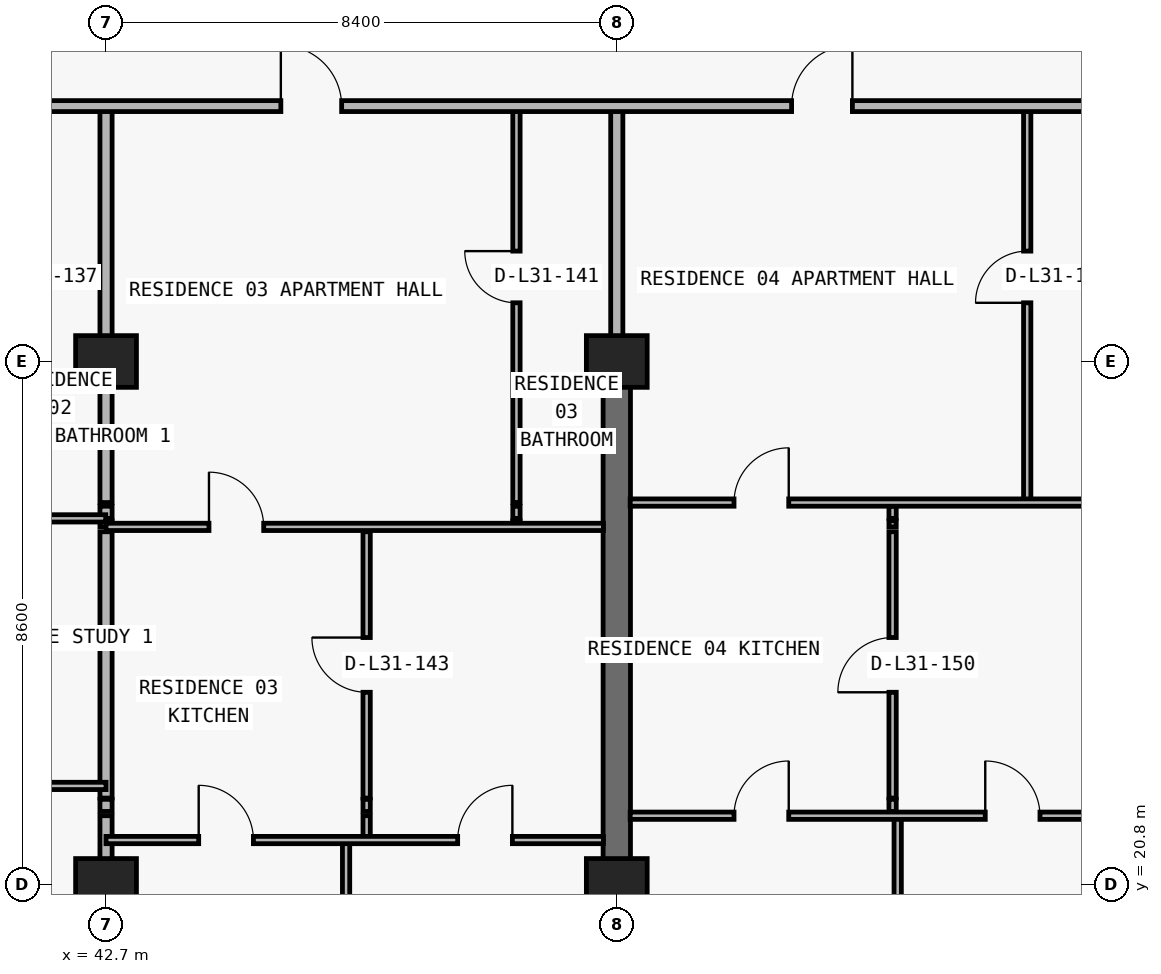
"""IFC4 building model, lengths in metres.
Left out: names, types, materials, properties, quantities, classifications, styles, units other than length and angle.
Written with IfcOpenShell. Run it as: python <this file> out.ifc"""

import sys

from ifc_helpers import new_model, si_unit, direction, frame, frame_2d, origin, origin_2d, place, context, subcontext, project, spatial, rectangle, extrude, element, fill, save


model = new_model("IFC4")
c1 = context("Model", 3, precision=1e-05, world=origin(), true_north=direction((0.0, 1.0)))
c2 = subcontext(c1, "Body", "Model", "MODEL_VIEW")
j1 = project(units=[si_unit("LENGTHUNIT", "METRE"), si_unit("PLANEANGLEUNIT", "RADIAN")], contexts=[c1])
p1 = place(None, origin())
s1 = spatial("IfcSite", under=j1, at=p1, CompositionType="ELEMENT")
p2 = place(p1, origin())
s2 = spatial("IfcBuilding", under=s1, at=p2, CompositionType="ELEMENT")
p3 = place(p2, frame((0.0, 0.0, 115.8)))
s3 = spatial("IfcBuildingStorey", under=s2, at=p3, CompositionType="ELEMENT", Elevation=115.8)
for number, where, z_axis, x_axis in (
    (1, (42.7, 20.8, 0.0), (0.0, 0.0, 1.0), (1.0, 0.0, 0.0)),
    (2, (51.1, 20.8, 0.0), (0.0, 0.0, 1.0), (1.0, 0.0, 0.0)),
    (3, (42.7, 29.4, 0.0), (0.0, 0.0, 1.0), (1.0, 0.0, 0.0)),
    (4, (51.1, 29.4, 0.0), (0.0, 0.0, 1.0), (1.0, 0.0, 0.0)),
):
    element("IfcColumn", number, at=place(p3, frame(where, z_axis=z_axis, x_axis=x_axis)), inside=s3, PredefinedType="COLUMN", context=c2, shape_type="SweptSolid", body=[
        extrude(rectangle(XDim=1.0, YDim=0.85, at=origin_2d()), origin(), (0.0, 0.0, 1.0), 3.05),
    ])
p4 = place(p3, frame((51.1, 20.8, 0.0), z_axis=(0.0, 0.0, 1.0), x_axis=(0.0, 1.0, 0.0)))
e5 = element("IfcWall", 5, at=p4, inside=s3, PredefinedType="SHEAR", context=c2, shape_type="SweptSolid", body=[
    extrude(rectangle(XDim=8.6, YDim=0.45, at=frame_2d((4.3, 0.0))), origin(), (0.0, 0.0, 1.0), 3.05),
])
p5 = place(p3, frame((42.7, 8.84, 0.0), z_axis=(0.0, 0.0, 1.0), x_axis=(0.0, 1.0, 0.0)))
e6 = element("IfcWall", 6, at=p5, inside=s3, PredefinedType="PARTITIONING", context=c2, shape_type="SweptSolid", body=[
    extrude(rectangle(XDim=13.09, YDim=0.2, at=frame_2d((6.545, 0.0))), origin(), (0.0, 0.0, 1.0), 2.174),
])
p6 = place(p3, frame((42.7, 22.0, 0.0), z_axis=(0.0, 0.0, 1.0), x_axis=(0.0, 1.0, 0.0)))
e7 = element("IfcWall", 7, at=p6, inside=s3, PredefinedType="PARTITIONING", context=c2, shape_type="SweptSolid", body=[
    extrude(rectangle(XDim=0.2, YDim=0.2, at=frame_2d((0.1, 0.0))), origin(), (0.0, 0.0, 1.0), 2.174),
])
p7 = place(p3, frame((42.7, 22.22, 0.0), z_axis=(0.0, 0.0, 1.0), x_axis=(0.0, 1.0, 0.0)))
e8 = element("IfcWall", 8, at=p7, inside=s3, PredefinedType="PARTITIONING", context=c2, shape_type="SweptSolid", body=[
    extrude(rectangle(XDim=4.38, YDim=0.2, at=frame_2d((2.19, 0.0))), origin(), (0.0, 0.0, 1.0), 2.174),
])
p8 = place(p3, frame((42.7, 26.68, 0.0), z_axis=(0.0, 0.0, 1.0), x_axis=(0.0, 1.0, 0.0)))
e9 = element("IfcWall", 9, at=p8, inside=s3, PredefinedType="PARTITIONING", context=c2, shape_type="SweptSolid", body=[
    extrude(rectangle(XDim=0.1, YDim=0.2, at=frame_2d((0.05, 0.0))), origin(), (0.0, 0.0, 1.0), 2.174),
])
p9 = place(p3, frame((42.7, 26.82, 0.0), z_axis=(0.0, 0.0, 1.0), x_axis=(0.0, 1.0, 0.0)))
e10 = element("IfcWall", 10, at=p9, inside=s3, PredefinedType="PARTITIONING", context=c2, shape_type="SweptSolid", body=[
    extrude(rectangle(XDim=0.2, YDim=0.2, at=frame_2d((0.1, 0.0))), origin(), (0.0, 0.0, 1.0), 2.174),
])
p10 = place(p3, frame((42.7, 27.08, 0.0), z_axis=(0.0, 0.0, 1.0), x_axis=(0.0, 1.0, 0.0)))
e11 = element("IfcWall", 11, at=p10, inside=s3, PredefinedType="PARTITIONING", context=c2, shape_type="SweptSolid", body=[
    extrude(rectangle(XDim=6.52, YDim=0.2, at=frame_2d((3.26, 0.0))), origin(), (0.0, 0.0, 1.0), 2.174),
])
p11 = place(p3, frame((46.648, 8.84, 0.0), z_axis=(0.0, 0.0, 1.0), x_axis=(0.0, 1.0, 0.0)))
e12 = element("IfcWall", 12, at=p11, inside=s3, PredefinedType="PARTITIONING", context=c2, shape_type="SweptSolid", body=[
    extrude(rectangle(XDim=12.69, YDim=0.12, at=frame_2d((6.345, 0.0))), origin(), (0.0, 0.0, 1.0), 3.05),
])
p12 = place(p3, frame((46.986, 21.53, 0.0), z_axis=(0.0, 0.0, 1.0), x_axis=(0.0, 1.0, 0.0)))
e13 = element("IfcWall", 13, at=p12, inside=s3, PredefinedType="PARTITIONING", context=c2, shape_type="SweptSolid", body=[
    extrude(rectangle(XDim=0.4, YDim=0.12, at=frame_2d((0.2, 0.0))), origin(), (0.0, 0.0, 1.0), 3.05),
])
p13 = place(p3, frame((46.986, 22.0, 0.0), z_axis=(0.0, 0.0, 1.0), x_axis=(0.0, 1.0, 0.0)))
e14 = element("IfcWall", 14, at=p13, inside=s3, PredefinedType="PARTITIONING", context=c2, shape_type="SweptSolid", body=[
    extrude(rectangle(XDim=0.2, YDim=0.12, at=frame_2d((0.1, 0.0))), origin(), (0.0, 0.0, 1.0), 3.05),
])
p14 = place(p3, frame((46.986, 22.22, 0.0), z_axis=(0.0, 0.0, 1.0), x_axis=(0.0, 1.0, 0.0)))
e15 = element("IfcWall", 15, at=p14, inside=s3, PredefinedType="PARTITIONING", context=c2, shape_type="SweptSolid", body=[
    extrude(rectangle(XDim=4.38, YDim=0.12, at=frame_2d((2.19, 0.0))), origin(), (0.0, 0.0, 1.0), 3.05),
])
p15 = place(p14, frame((1.74, 0.0, 0.0)))
e16 = element("IfcOpeningElement", 16, at=p15, cuts=e15, PredefinedType="OPENING", context=c2, shape_type="SweptSolid", body=[
    extrude(rectangle(XDim=0.9, YDim=2.15, at=frame_2d((0.45, 1.075))), frame((0.0, 0.07, 0.0), z_axis=(0.0, -1.0, 0.0), x_axis=(1.0, 0.0, 0.0)), (0.0, 0.0, 1.0), 0.14),
])
p16 = place(p3, frame((49.45, 26.68, 0.0), z_axis=(0.0, 0.0, 1.0), x_axis=(0.0, 1.0, 0.0)))
e17 = element("IfcWall", 17, at=p16, inside=s3, PredefinedType="PARTITIONING", context=c2, shape_type="SweptSolid", body=[
    extrude(rectangle(XDim=0.1, YDim=0.12, at=frame_2d((0.05, 0.0))), origin(), (0.0, 0.0, 1.0), 3.05),
])
p17 = place(p3, frame((49.45, 26.82, 0.0), z_axis=(0.0, 0.0, 1.0), x_axis=(0.0, 1.0, 0.0)))
e18 = element("IfcWall", 18, at=p17, inside=s3, PredefinedType="PARTITIONING", context=c2, shape_type="SweptSolid", body=[
    extrude(rectangle(XDim=0.2, YDim=0.12, at=frame_2d((0.1, 0.0))), origin(), (0.0, 0.0, 1.0), 3.05),
])
p18 = place(p3, frame((49.45, 27.08, 0.0), z_axis=(0.0, 0.0, 1.0), x_axis=(0.0, 1.0, 0.0)))
e19 = element("IfcWall", 19, at=p18, inside=s3, PredefinedType="PARTITIONING", context=c2, shape_type="SweptSolid", body=[
    extrude(rectangle(XDim=6.52, YDim=0.12, at=frame_2d((3.26, 0.0))), origin(), (0.0, 0.0, 1.0), 3.05),
])
p19 = place(p18, frame((3.285, 0.0, 0.0)))
e20 = element("IfcOpeningElement", 20, at=p19, cuts=e19, PredefinedType="OPENING", context=c2, shape_type="SweptSolid", body=[
    extrude(rectangle(XDim=0.85, YDim=2.1, at=frame_2d((0.425, 1.05))), frame((0.0, 0.07, 0.0), z_axis=(0.0, -1.0, 0.0), x_axis=(1.0, 0.0, 0.0)), (0.0, 0.0, 1.0), 0.14),
])
p20 = place(p3, frame((51.1, 8.84, 0.0), z_axis=(0.0, 0.0, 1.0), x_axis=(0.0, 1.0, 0.0)))
e21 = element("IfcWall", 21, at=p20, inside=s3, PredefinedType="PARTITIONING", context=c2, shape_type="SweptSolid", body=[
    extrude(rectangle(XDim=11.955, YDim=0.2, at=frame_2d((5.978, 0.0))), origin(), (0.0, 0.0, 1.0), 2.174),
])
p21 = place(p3, frame((51.1, 29.405, 0.0), z_axis=(0.0, 0.0, 1.0), x_axis=(0.0, 1.0, 0.0)))
e22 = element("IfcWall", 22, at=p21, inside=s3, PredefinedType="PARTITIONING", context=c2, shape_type="SweptSolid", body=[
    extrude(rectangle(XDim=4.195, YDim=0.2, at=frame_2d((2.098, 0.0))), origin(), (0.0, 0.0, 1.0), 2.335),
])
p22 = place(p3, frame((55.636, 22.0, 0.0), z_axis=(0.0, 0.0, 1.0), x_axis=(0.0, 1.0, 0.0)))
e23 = element("IfcWall", 23, at=p22, inside=s3, PredefinedType="PARTITIONING", context=c2, shape_type="SweptSolid", body=[
    extrude(rectangle(XDim=0.2, YDim=0.12, at=frame_2d((0.1, 0.0))), origin(), (0.0, 0.0, 1.0), 3.05),
])
p23 = place(p3, frame((55.636, 22.22, 0.0), z_axis=(0.0, 0.0, 1.0), x_axis=(0.0, 1.0, 0.0)))
e24 = element("IfcWall", 24, at=p23, inside=s3, PredefinedType="PARTITIONING", context=c2, shape_type="SweptSolid", body=[
    extrude(rectangle(XDim=4.38, YDim=0.12, at=frame_2d((2.19, 0.0))), origin(), (0.0, 0.0, 1.0), 3.05),
])
p24 = place(p23, frame((1.74, 0.0, 0.0)))
e25 = element("IfcOpeningElement", 25, at=p24, cuts=e24, PredefinedType="OPENING", context=c2, shape_type="SweptSolid", body=[
    extrude(rectangle(XDim=0.9, YDim=2.15, at=frame_2d((0.45, 1.075))), frame((0.0, 0.07, 0.0), z_axis=(0.0, -1.0, 0.0), x_axis=(1.0, 0.0, 0.0)), (0.0, 0.0, 1.0), 0.14),
])
p25 = place(p3, frame((55.636, 26.68, 0.0), z_axis=(0.0, 0.0, 1.0), x_axis=(0.0, 1.0, 0.0)))
e26 = element("IfcWall", 26, at=p25, inside=s3, PredefinedType="PARTITIONING", context=c2, shape_type="SweptSolid", body=[
    extrude(rectangle(XDim=0.1, YDim=0.12, at=frame_2d((0.05, 0.0))), origin(), (0.0, 0.0, 1.0), 3.05),
])
p26 = place(p3, frame((55.636, 26.82, 0.0), z_axis=(0.0, 0.0, 1.0), x_axis=(0.0, 1.0, 0.0)))
e27 = element("IfcWall", 27, at=p26, inside=s3, PredefinedType="PARTITIONING", context=c2, shape_type="SweptSolid", body=[
    extrude(rectangle(XDim=0.2, YDim=0.12, at=frame_2d((0.1, 0.0))), origin(), (0.0, 0.0, 1.0), 3.05),
])
p27 = place(p3, frame((55.72, 8.84, 0.0), z_axis=(0.0, 0.0, 1.0), x_axis=(0.0, 1.0, 0.0)))
e28 = element("IfcWall", 28, at=p27, inside=s3, PredefinedType="PARTITIONING", context=c2, shape_type="SweptSolid", body=[
    extrude(rectangle(XDim=13.09, YDim=0.12, at=frame_2d((6.545, 0.0))), origin(), (0.0, 0.0, 1.0), 3.05),
])
p28 = place(p3, frame((57.85, 27.08, 0.0), z_axis=(0.0, 0.0, 1.0), x_axis=(0.0, 1.0, 0.0)))
e29 = element("IfcWall", 29, at=p28, inside=s3, PredefinedType="PARTITIONING", context=c2, shape_type="SweptSolid", body=[
    extrude(rectangle(XDim=6.52, YDim=0.12, at=frame_2d((3.26, 0.0))), origin(), (0.0, 0.0, 1.0), 3.05),
])
p29 = place(p28, frame((3.285, 0.0, 0.0)))
e30 = element("IfcOpeningElement", 30, at=p29, cuts=e29, PredefinedType="OPENING", context=c2, shape_type="SweptSolid", body=[
    extrude(rectangle(XDim=0.85, YDim=2.1, at=frame_2d((0.425, 1.05))), frame((0.0, 0.07, 0.0), z_axis=(0.0, -1.0, 0.0), x_axis=(1.0, 0.0, 0.0)), (0.0, 0.0, 1.0), 0.14),
])
p30 = place(p3, frame((42.7, 21.53, 0.0), z_axis=(0.0, 0.0, 1.0), x_axis=(1.0, 0.0, 0.0)))
e31 = element("IfcWall", 31, at=p30, inside=s3, PredefinedType="PARTITIONING", context=c2, shape_type="SweptSolid", body=[
    extrude(rectangle(XDim=8.18, YDim=0.12, at=frame_2d((4.09, 0.0))), origin(), (0.0, 0.0, 1.0), 3.05),
])
p31 = place(p30, frame((1.524, 0.0, 0.0)))
e32 = element("IfcOpeningElement", 32, at=p31, cuts=e31, PredefinedType="OPENING", context=c2, shape_type="SweptSolid", body=[
    extrude(rectangle(XDim=0.9, YDim=2.15, at=frame_2d((0.45, 1.075))), frame((0.0, 0.07, 0.0), z_axis=(0.0, -1.0, 0.0), x_axis=(1.0, 0.0, 0.0)), (0.0, 0.0, 1.0), 0.14),
])
p32 = place(p30, frame((5.783, 0.0, 0.0)))
e33 = element("IfcOpeningElement", 33, at=p32, cuts=e31, PredefinedType="OPENING", context=c2, shape_type="SweptSolid", body=[
    extrude(rectangle(XDim=0.9, YDim=2.15, at=frame_2d((0.45, 1.075))), frame((0.0, 0.07, 0.0), z_axis=(0.0, -1.0, 0.0), x_axis=(1.0, 0.0, 0.0)), (0.0, 0.0, 1.0), 0.14),
])
p33 = place(p3, frame((51.32, 21.93, 0.0), z_axis=(0.0, 0.0, 1.0), x_axis=(1.0, 0.0, 0.0)))
e34 = element("IfcWall", 34, at=p33, inside=s3, PredefinedType="PARTITIONING", context=c2, shape_type="SweptSolid", body=[
    extrude(rectangle(XDim=8.18, YDim=0.12, at=frame_2d((4.09, 0.0))), origin(), (0.0, 0.0, 1.0), 3.05),
])
p34 = place(p33, frame((1.708, 0.0, 0.0)))
e35 = element("IfcOpeningElement", 35, at=p34, cuts=e34, PredefinedType="OPENING", context=c2, shape_type="SweptSolid", body=[
    extrude(rectangle(XDim=0.9, YDim=2.15, at=frame_2d((0.45, 1.075))), frame((0.0, 0.07, 0.0), z_axis=(0.0, -1.0, 0.0), x_axis=(1.0, 0.0, 0.0)), (0.0, 0.0, 1.0), 0.14),
])
p35 = place(p33, frame((5.84, 0.0, 0.0)))
e36 = element("IfcOpeningElement", 36, at=p35, cuts=e34, PredefinedType="OPENING", context=c2, shape_type="SweptSolid", body=[
    extrude(rectangle(XDim=0.9, YDim=2.15, at=frame_2d((0.45, 1.075))), frame((0.0, 0.07, 0.0), z_axis=(0.0, -1.0, 0.0), x_axis=(1.0, 0.0, 0.0)), (0.0, 0.0, 1.0), 0.14),
])
p36 = place(p3, frame((35.1, 22.42, 0.0), z_axis=(0.0, 0.0, 1.0), x_axis=(1.0, 0.0, 0.0)))
e37 = element("IfcWall", 37, at=p36, inside=s3, PredefinedType="PARTITIONING", context=c2, shape_type="SweptSolid", body=[
    extrude(rectangle(XDim=7.6, YDim=0.12, at=frame_2d((3.8, 0.0))), origin(), (0.0, 0.0, 1.0), 3.05),
])
p37 = place(p36, frame((3.35, 0.0, 0.0)))
e38 = element("IfcOpeningElement", 38, at=p37, cuts=e37, PredefinedType="OPENING", context=c2, shape_type="SweptSolid", body=[
    extrude(rectangle(XDim=0.9, YDim=2.15, at=frame_2d((0.45, 1.075))), frame((0.0, 0.07, 0.0), z_axis=(0.0, -1.0, 0.0), x_axis=(1.0, 0.0, 0.0)), (0.0, 0.0, 1.0), 0.14),
])
p38 = place(p3, frame((42.7, 26.68, 0.0), z_axis=(0.0, 0.0, 1.0), x_axis=(1.0, 0.0, 0.0)))
e39 = element("IfcWall", 39, at=p38, inside=s3, PredefinedType="PARTITIONING", context=c2, shape_type="SweptSolid", body=[
    extrude(rectangle(XDim=8.18, YDim=0.12, at=frame_2d((4.09, 0.0))), origin(), (0.0, 0.0, 1.0), 3.05),
])
p39 = place(p38, frame((1.693, 0.0, 0.0)))
e40 = element("IfcOpeningElement", 40, at=p39, cuts=e39, PredefinedType="OPENING", context=c2, shape_type="SweptSolid", body=[
    extrude(rectangle(XDim=0.9, YDim=2.15, at=frame_2d((0.45, 1.075))), frame((0.0, 0.07, 0.0), z_axis=(0.0, -1.0, 0.0), x_axis=(1.0, 0.0, 0.0)), (0.0, 0.0, 1.0), 0.14),
])
p40 = place(p3, frame((35.1, 26.82, 0.0), z_axis=(0.0, 0.0, 1.0), x_axis=(1.0, 0.0, 0.0)))
e41 = element("IfcWall", 41, at=p40, inside=s3, PredefinedType="PARTITIONING", context=c2, shape_type="SweptSolid", body=[
    extrude(rectangle(XDim=7.595, YDim=0.12, at=frame_2d((3.797, 0.0))), origin(), (0.0, 0.0, 1.0), 3.05),
])
p41 = place(p40, frame((2.6, 0.0, 0.0)))
e42 = element("IfcOpeningElement", 42, at=p41, cuts=e41, PredefinedType="OPENING", context=c2, shape_type="SweptSolid", body=[
    extrude(rectangle(XDim=0.9, YDim=2.15, at=frame_2d((0.45, 1.075))), frame((0.0, 0.07, 0.0), z_axis=(0.0, -1.0, 0.0), x_axis=(1.0, 0.0, 0.0)), (0.0, 0.0, 1.0), 0.14),
])
p42 = place(p3, frame((51.32, 27.08, 0.0), z_axis=(0.0, 0.0, 1.0), x_axis=(1.0, 0.0, 0.0)))
e43 = element("IfcWall", 43, at=p42, inside=s3, PredefinedType="PARTITIONING", context=c2, shape_type="SweptSolid", body=[
    extrude(rectangle(XDim=8.18, YDim=0.12, at=frame_2d((4.09, 0.0))), origin(), (0.0, 0.0, 1.0), 3.05),
])
p43 = place(p42, frame((1.708, 0.0, 0.0)))
e44 = element("IfcOpeningElement", 44, at=p43, cuts=e43, PredefinedType="OPENING", context=c2, shape_type="SweptSolid", body=[
    extrude(rectangle(XDim=0.9, YDim=2.15, at=frame_2d((0.45, 1.075))), frame((0.0, 0.07, 0.0), z_axis=(0.0, -1.0, 0.0), x_axis=(1.0, 0.0, 0.0)), (0.0, 0.0, 1.0), 0.14),
])
p44 = place(p3, frame((18.3, 33.6, 0.0), z_axis=(0.0, 0.0, 1.0), x_axis=(1.0, 0.0, 0.0)))
e45 = element("IfcWall", 45, at=p44, inside=s3, PredefinedType="PARTITIONING", context=c2, shape_type="SweptSolid", body=[
    extrude(rectangle(XDim=41.2, YDim=0.18, at=frame_2d((20.6, 0.0))), origin(), (0.0, 0.0, 1.0), 3.05),
])
p45 = place(p44, frame((11.35, 0.0, 0.0)))
e46 = element("IfcOpeningElement", 46, at=p45, cuts=e45, PredefinedType="OPENING", context=c2, shape_type="SweptSolid", body=[
    extrude(rectangle(XDim=1.0, YDim=2.2, at=frame_2d((0.5, 1.1))), frame((0.0, 0.1, 0.0), z_axis=(0.0, -1.0, 0.0), x_axis=(1.0, 0.0, 0.0)), (0.0, 0.0, 1.0), 0.2),
])
p46 = place(p44, frame((27.275, 0.0, 0.0)))
e47 = element("IfcOpeningElement", 47, at=p46, cuts=e45, PredefinedType="OPENING", context=c2, shape_type="SweptSolid", body=[
    extrude(rectangle(XDim=1.0, YDim=2.2, at=frame_2d((0.5, 1.1))), frame((0.0, 0.1, 0.0), z_axis=(0.0, -1.0, 0.0), x_axis=(1.0, 0.0, 0.0)), (0.0, 0.0, 1.0), 0.2),
])
p47 = place(p44, frame((35.675, 0.0, 0.0)))
e48 = element("IfcOpeningElement", 48, at=p47, cuts=e45, PredefinedType="OPENING", context=c2, shape_type="SweptSolid", body=[
    extrude(rectangle(XDim=1.0, YDim=2.2, at=frame_2d((0.5, 1.1))), frame((0.0, 0.1, 0.0), z_axis=(0.0, -1.0, 0.0), x_axis=(1.0, 0.0, 0.0)), (0.0, 0.0, 1.0), 0.2),
])
p48 = place(p46, origin())
e49 = element("IfcDoor", 49, at=p48, inside=s3, OperationType="SINGLE_SWING_LEFT", PredefinedType="DOOR", context=c2, shape_type="SweptSolid", body=[
    extrude(rectangle(XDim=1.0, YDim=2.2, at=frame_2d((0.5, 1.1))), frame((0.0, 0.025, 0.0), z_axis=(0.0, -1.0, 0.0), x_axis=(1.0, 0.0, 0.0)), (0.0, 0.0, 1.0), 0.05),
])
fill(e47, e49)
p49 = place(p19, origin())
e50 = element("IfcDoor", 50, at=p49, inside=s3, OperationType="SINGLE_SWING_RIGHT", PredefinedType="DOOR", context=c2, shape_type="SweptSolid", body=[
    extrude(rectangle(XDim=0.85, YDim=2.1, at=frame_2d((0.425, 1.05))), frame((0.0, 0.025, 0.0), z_axis=(0.0, -1.0, 0.0), x_axis=(1.0, 0.0, 0.0)), (0.0, 0.0, 1.0), 0.05),
])
fill(e20, e50)
p50 = place(p39, origin())
e51 = element("IfcDoor", 51, at=p50, inside=s3, OperationType="SINGLE_SWING_LEFT", PredefinedType="DOOR", context=c2, shape_type="SweptSolid", body=[
    extrude(rectangle(XDim=0.9, YDim=2.15, at=frame_2d((0.45, 1.075))), frame((0.0, 0.025, 0.0), z_axis=(0.0, -1.0, 0.0), x_axis=(1.0, 0.0, 0.0)), (0.0, 0.0, 1.0), 0.05),
])
fill(e40, e51)
p51 = place(p15, origin())
e52 = element("IfcDoor", 52, at=p51, inside=s3, OperationType="SINGLE_SWING_RIGHT", PredefinedType="DOOR", context=c2, shape_type="SweptSolid", body=[
    extrude(rectangle(XDim=0.9, YDim=2.15, at=frame_2d((0.45, 1.075))), frame((0.0, 0.025, 0.0), z_axis=(0.0, -1.0, 0.0), x_axis=(1.0, 0.0, 0.0)), (0.0, 0.0, 1.0), 0.05),
])
fill(e16, e52)
p52 = place(p31, origin())
e53 = element("IfcDoor", 53, at=p52, inside=s3, OperationType="SINGLE_SWING_LEFT", PredefinedType="DOOR", context=c2, shape_type="SweptSolid", body=[
    extrude(rectangle(XDim=0.9, YDim=2.15, at=frame_2d((0.45, 1.075))), frame((0.0, 0.025, 0.0), z_axis=(0.0, -1.0, 0.0), x_axis=(1.0, 0.0, 0.0)), (0.0, 0.0, 1.0), 0.05),
])
fill(e32, e53)
p53 = place(p32, origin())
e54 = element("IfcDoor", 54, at=p53, inside=s3, OperationType="SINGLE_SWING_RIGHT", PredefinedType="DOOR", context=c2, shape_type="SweptSolid", body=[
    extrude(rectangle(XDim=0.9, YDim=2.15, at=frame_2d((0.45, 1.075))), frame((0.0, 0.025, 0.0), z_axis=(0.0, -1.0, 0.0), x_axis=(1.0, 0.0, 0.0)), (0.0, 0.0, 1.0), 0.05),
])
fill(e33, e54)
p54 = place(p47, origin())
e55 = element("IfcDoor", 55, at=p54, inside=s3, OperationType="SINGLE_SWING_RIGHT", PredefinedType="DOOR", context=c2, shape_type="SweptSolid", body=[
    extrude(rectangle(XDim=1.0, YDim=2.2, at=frame_2d((0.5, 1.1))), frame((0.0, 0.025, 0.0), z_axis=(0.0, -1.0, 0.0), x_axis=(1.0, 0.0, 0.0)), (0.0, 0.0, 1.0), 0.05),
])
fill(e48, e55)
p55 = place(p29, origin())
e56 = element("IfcDoor", 56, at=p55, inside=s3, OperationType="SINGLE_SWING_LEFT", PredefinedType="DOOR", context=c2, shape_type="SweptSolid", body=[
    extrude(rectangle(XDim=0.85, YDim=2.1, at=frame_2d((0.425, 1.05))), frame((0.0, 0.025, 0.0), z_axis=(0.0, -1.0, 0.0), x_axis=(1.0, 0.0, 0.0)), (0.0, 0.0, 1.0), 0.05),
])
fill(e30, e56)
p56 = place(p43, origin())
e57 = element("IfcDoor", 57, at=p56, inside=s3, OperationType="SINGLE_SWING_RIGHT", PredefinedType="DOOR", context=c2, shape_type="SweptSolid", body=[
    extrude(rectangle(XDim=0.9, YDim=2.15, at=frame_2d((0.45, 1.075))), frame((0.0, 0.025, 0.0), z_axis=(0.0, -1.0, 0.0), x_axis=(1.0, 0.0, 0.0)), (0.0, 0.0, 1.0), 0.05),
])
fill(e44, e57)
p57 = place(p24, origin())
e58 = element("IfcDoor", 58, at=p57, inside=s3, OperationType="SINGLE_SWING_LEFT", PredefinedType="DOOR", context=c2, shape_type="SweptSolid", body=[
    extrude(rectangle(XDim=0.9, YDim=2.15, at=frame_2d((0.45, 1.075))), frame((0.0, 0.025, 0.0), z_axis=(0.0, -1.0, 0.0), x_axis=(1.0, 0.0, 0.0)), (0.0, 0.0, 1.0), 0.05),
])
fill(e25, e58)
p58 = place(p34, origin())
e59 = element("IfcDoor", 59, at=p58, inside=s3, OperationType="SINGLE_SWING_RIGHT", PredefinedType="DOOR", context=c2, shape_type="SweptSolid", body=[
    extrude(rectangle(XDim=0.9, YDim=2.15, at=frame_2d((0.45, 1.075))), frame((0.0, 0.025, 0.0), z_axis=(0.0, -1.0, 0.0), x_axis=(1.0, 0.0, 0.0)), (0.0, 0.0, 1.0), 0.05),
])
fill(e35, e59)
p59 = place(p35, origin())
e60 = element("IfcDoor", 60, at=p59, inside=s3, OperationType="SINGLE_SWING_LEFT", PredefinedType="DOOR", context=c2, shape_type="SweptSolid", body=[
    extrude(rectangle(XDim=0.9, YDim=2.15, at=frame_2d((0.45, 1.075))), frame((0.0, 0.025, 0.0), z_axis=(0.0, -1.0, 0.0), x_axis=(1.0, 0.0, 0.0)), (0.0, 0.0, 1.0), 0.05),
])
fill(e36, e60)
save(model, sys.argv[1])
